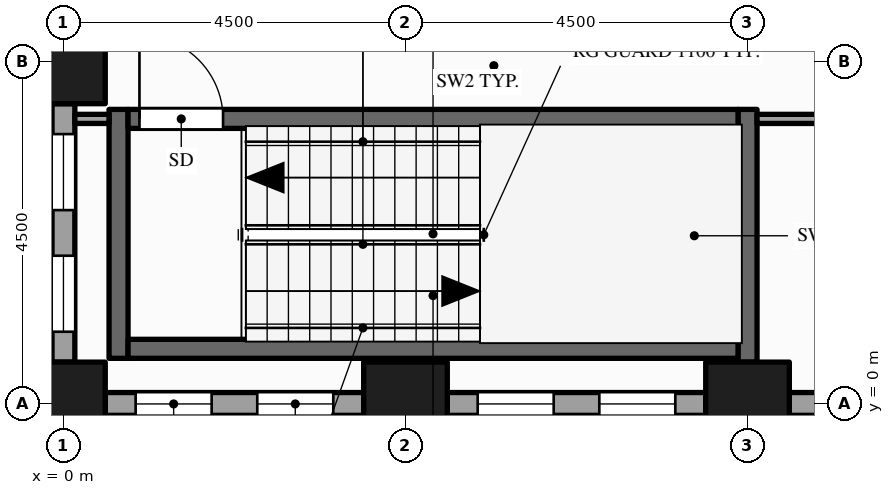
"""IFC4 building model, lengths in metres.
Left out: names, types, materials, properties, quantities, classifications, styles, units other than length and angle.
Written with IfcOpenShell. Run it as: python <this file> out.ifc"""

import sys

from ifc_helpers import new_model, si_unit, direction, frame, frame_2d, origin, origin_2d, place, context, subcontext, project, spatial, rectangle, hollow_rectangle, extrude, element, fill, save


model = new_model("IFC4")
c1 = context("Model", 3, precision=1e-05, world=origin(), true_north=direction((0.0, 1.0)))
c2 = subcontext(c1, "Body", "Model", "MODEL_VIEW")
j1 = project(units=[si_unit("LENGTHUNIT", "METRE"), si_unit("PLANEANGLEUNIT", "RADIAN")], contexts=[c1])
p1 = place(None, origin())
s1 = spatial("IfcSite", under=j1, at=p1, CompositionType="ELEMENT")
p2 = place(p1, origin())
s2 = spatial("IfcBuilding", under=s1, at=p2, CompositionType="ELEMENT")
p3 = place(p2, frame((0.0, 0.0, 61.0)))
s3 = spatial("IfcBuildingStorey", under=s2, at=p3, CompositionType="ELEMENT", Elevation=61.0)
for number, where, z_axis, x_axis in (
    (1, (0.0, 0.0, -0.15), (0.0, 0.0, 1.0), (1.0, 0.0, 0.0)),
    (2, (0.0, 4.5, -0.15), (0.0, 0.0, 1.0), (1.0, 0.0, 0.0)),
    (3, (4.5, 0.0, -0.15), (0.0, 0.0, 1.0), (1.0, 0.0, 0.0)),
    (4, (9.0, 0.0, -0.15), (0.0, 0.0, 1.0), (1.0, 0.0, 0.0)),
):
    element("IfcColumn", number, at=place(p3, frame(where, z_axis=z_axis, x_axis=x_axis)), inside=s3, PredefinedType="COLUMN", context=c2, shape_type="SweptSolid", body=[
        extrude(hollow_rectangle(XDim=1.1, YDim=1.1, WallThickness=0.06, at=origin_2d()), origin(), (0.0, 0.0, 1.0), 4.0),
    ])
p4 = place(p3, frame((0.55, 0.0, 0.0), z_axis=(0.0, 0.0, 1.0), x_axis=(1.0, 0.0, 0.0)))
e5 = element("IfcWall", 5, at=p4, inside=s3, PredefinedType="STANDARD", context=c2, shape_type="SweptSolid", body=[
    extrude(rectangle(XDim=3.4, YDim=0.3, at=frame_2d((1.7, 0.0))), origin(), (0.0, 0.0, 1.0), 3.144),
])
p5 = place(p4, frame((0.4, 0.0, 0.9)))
e6 = element("IfcOpeningElement", 6, at=p5, cuts=e5, PredefinedType="OPENING", context=c2, shape_type="SweptSolid", body=[
    extrude(rectangle(XDim=1.0, YDim=2.0, at=frame_2d((0.5, 1.0))), frame((0.0, 0.16, 0.0), z_axis=(0.0, -1.0, 0.0), x_axis=(1.0, 0.0, 0.0)), (0.0, 0.0, 1.0), 0.32),
])
p6 = place(p4, frame((2.0, 0.0, 0.9)))
e7 = element("IfcOpeningElement", 7, at=p6, cuts=e5, PredefinedType="OPENING", context=c2, shape_type="SweptSolid", body=[
    extrude(rectangle(XDim=1.0, YDim=2.0, at=frame_2d((0.5, 1.0))), frame((0.0, 0.16, 0.0), z_axis=(0.0, -1.0, 0.0), x_axis=(1.0, 0.0, 0.0)), (0.0, 0.0, 1.0), 0.32),
])
p7 = place(p3, frame((5.05, 0.0, 0.0), z_axis=(0.0, 0.0, 1.0), x_axis=(1.0, 0.0, 0.0)))
e8 = element("IfcWall", 8, at=p7, inside=s3, PredefinedType="STANDARD", context=c2, shape_type="SweptSolid", body=[
    extrude(rectangle(XDim=3.4, YDim=0.3, at=frame_2d((1.7, 0.0))), origin(), (0.0, 0.0, 1.0), 3.144),
])
p8 = place(p7, frame((0.4, 0.0, 0.9)))
e9 = element("IfcOpeningElement", 9, at=p8, cuts=e8, PredefinedType="OPENING", context=c2, shape_type="SweptSolid", body=[
    extrude(rectangle(XDim=1.0, YDim=2.0, at=frame_2d((0.5, 1.0))), frame((0.0, 0.16, 0.0), z_axis=(0.0, -1.0, 0.0), x_axis=(1.0, 0.0, 0.0)), (0.0, 0.0, 1.0), 0.32),
])
p9 = place(p7, frame((2.0, 0.0, 0.9)))
e10 = element("IfcOpeningElement", 10, at=p9, cuts=e8, PredefinedType="OPENING", context=c2, shape_type="SweptSolid", body=[
    extrude(rectangle(XDim=1.0, YDim=2.0, at=frame_2d((0.5, 1.0))), frame((0.0, 0.16, 0.0), z_axis=(0.0, -1.0, 0.0), x_axis=(1.0, 0.0, 0.0)), (0.0, 0.0, 1.0), 0.32),
])
p10 = place(p3, frame((9.55, 0.0, 0.0), z_axis=(0.0, 0.0, 1.0), x_axis=(1.0, 0.0, 0.0)))
e11 = element("IfcWall", 11, at=p10, inside=s3, PredefinedType="STANDARD", context=c2, shape_type="SweptSolid", body=[
    extrude(rectangle(XDim=3.4, YDim=0.3, at=frame_2d((1.7, 0.0))), origin(), (0.0, 0.0, 1.0), 3.144),
])
p11 = place(p10, frame((0.4, 0.0, 0.9)))
e12 = element("IfcOpeningElement", 12, at=p11, cuts=e11, PredefinedType="OPENING", context=c2, shape_type="SweptSolid", body=[
    extrude(rectangle(XDim=1.0, YDim=2.0, at=frame_2d((0.5, 1.0))), frame((0.0, 0.16, 0.0), z_axis=(0.0, -1.0, 0.0), x_axis=(1.0, 0.0, 0.0)), (0.0, 0.0, 1.0), 0.32),
])
p12 = place(p10, frame((2.0, 0.0, 0.9)))
e13 = element("IfcOpeningElement", 13, at=p12, cuts=e11, PredefinedType="OPENING", context=c2, shape_type="SweptSolid", body=[
    extrude(rectangle(XDim=1.0, YDim=2.0, at=frame_2d((0.5, 1.0))), frame((0.0, 0.16, 0.0), z_axis=(0.0, -1.0, 0.0), x_axis=(1.0, 0.0, 0.0)), (0.0, 0.0, 1.0), 0.32),
])
p13 = place(p3, frame((0.0, 3.95, 0.0), z_axis=(0.0, 0.0, 1.0), x_axis=(0.0, -1.0, 0.0)))
e14 = element("IfcWall", 14, at=p13, inside=s3, PredefinedType="STANDARD", context=c2, shape_type="SweptSolid", body=[
    extrude(rectangle(XDim=3.4, YDim=0.3, at=frame_2d((1.7, 0.0))), origin(), (0.0, 0.0, 1.0), 3.144),
])
p14 = place(p13, frame((0.4, 0.0, 0.9)))
e15 = element("IfcOpeningElement", 15, at=p14, cuts=e14, PredefinedType="OPENING", context=c2, shape_type="SweptSolid", body=[
    extrude(rectangle(XDim=1.0, YDim=2.0, at=frame_2d((0.5, 1.0))), frame((0.0, 0.16, 0.0), z_axis=(0.0, -1.0, 0.0), x_axis=(1.0, 0.0, 0.0)), (0.0, 0.0, 1.0), 0.32),
])
p15 = place(p13, frame((2.0, 0.0, 0.9)))
e16 = element("IfcOpeningElement", 16, at=p15, cuts=e14, PredefinedType="OPENING", context=c2, shape_type="SweptSolid", body=[
    extrude(rectangle(XDim=1.0, YDim=2.0, at=frame_2d((0.5, 1.0))), frame((0.0, 0.16, 0.0), z_axis=(0.0, -1.0, 0.0), x_axis=(1.0, 0.0, 0.0)), (0.0, 0.0, 1.0), 0.32),
])
p16 = place(p3, frame((0.725, 0.6, 0.0), z_axis=(0.0, 0.0, 1.0), x_axis=(0.0, 1.0, 0.0)))
e17 = element("IfcWall", 17, at=p16, inside=s3, PredefinedType="SHEAR", context=c2, shape_type="SweptSolid", body=[
    extrude(rectangle(XDim=3.275, YDim=0.25, at=frame_2d((1.637, 0.0))), origin(), (0.0, 0.0, 1.0), 3.85),
])
p17 = place(p3, frame((9.0, 0.55, 0.0), z_axis=(0.0, 0.0, 1.0), x_axis=(0.0, 1.0, 0.0)))
e18 = element("IfcWall", 18, at=p17, inside=s3, PredefinedType="SHEAR", context=c2, shape_type="SweptSolid", body=[
    extrude(rectangle(XDim=3.325, YDim=0.25, at=frame_2d((1.663, 0.0))), origin(), (0.0, 0.0, 1.0), 3.85),
])
p18 = place(p3, frame((0.85, 0.725, 0.0), z_axis=(0.0, 0.0, 1.0), x_axis=(1.0, 0.0, 0.0)))
e19 = element("IfcWall", 19, at=p18, inside=s3, PredefinedType="SHEAR", context=c2, shape_type="SweptSolid", body=[
    extrude(rectangle(XDim=8.025, YDim=0.25, at=frame_2d((4.012, 0.0))), origin(), (0.0, 0.0, 1.0), 3.85),
])
p19 = place(p3, frame((0.15, 3.75, 0.0), z_axis=(0.0, 0.0, 1.0), x_axis=(1.0, 0.0, 0.0)))
e20 = element("IfcWall", 20, at=p19, inside=s3, PredefinedType="PARTITIONING", context=c2, shape_type="SweptSolid", body=[
    extrude(rectangle(XDim=0.45, YDim=0.12, at=frame_2d((0.225, 0.0))), origin(), (0.0, 0.0, 1.0), 3.144),
])
p20 = place(p3, frame((0.85, 3.75, 0.0), z_axis=(0.0, 0.0, 1.0), x_axis=(1.0, 0.0, 0.0)))
e21 = element("IfcWall", 21, at=p20, inside=s3, PredefinedType="SHEAR", context=c2, shape_type="SweptSolid", body=[
    extrude(rectangle(XDim=8.025, YDim=0.25, at=frame_2d((4.012, 0.0))), origin(), (0.0, 0.0, 1.0), 3.85),
])
p21 = place(p20, frame((0.15, 0.0, 0.0)))
e22 = element("IfcOpeningElement", 22, at=p21, cuts=e21, PredefinedType="OPENING", context=c2, shape_type="SweptSolid", body=[
    extrude(rectangle(XDim=1.1, YDim=2.1, at=frame_2d((0.55, 1.05))), frame((0.0, 0.135, 0.0), z_axis=(0.0, -1.0, 0.0), x_axis=(1.0, 0.0, 0.0)), (0.0, 0.0, 1.0), 0.27),
])
p22 = place(p3, frame((9.125, 3.75, 0.0), z_axis=(0.0, 0.0, 1.0), x_axis=(1.0, 0.0, 0.0)))
e23 = element("IfcWall", 23, at=p22, inside=s3, PredefinedType="PARTITIONING", context=c2, shape_type="SweptSolid", body=[
    extrude(rectangle(XDim=4.315, YDim=0.12, at=frame_2d((2.157, 0.0))), origin(), (0.0, 0.0, 1.0), 2.938),
])
p23 = place(p5, origin())
e24 = element("IfcWindow", 24, at=p23, inside=s3, PartitioningType="SINGLE_PANEL", PredefinedType="WINDOW", context=c2, shape_type="SweptSolid", body=[
    extrude(rectangle(XDim=1.0, YDim=2.0, at=frame_2d((0.5, 1.0))), frame((0.0, 0.03, 0.0), z_axis=(0.0, -1.0, 0.0), x_axis=(1.0, 0.0, 0.0)), (0.0, 0.0, 1.0), 0.06),
])
fill(e6, e24)
p24 = place(p6, origin())
e25 = element("IfcWindow", 25, at=p24, inside=s3, PartitioningType="SINGLE_PANEL", PredefinedType="WINDOW", context=c2, shape_type="SweptSolid", body=[
    extrude(rectangle(XDim=1.0, YDim=2.0, at=frame_2d((0.5, 1.0))), frame((0.0, 0.03, 0.0), z_axis=(0.0, -1.0, 0.0), x_axis=(1.0, 0.0, 0.0)), (0.0, 0.0, 1.0), 0.06),
])
fill(e7, e25)
p25 = place(p8, origin())
e26 = element("IfcWindow", 26, at=p25, inside=s3, PartitioningType="SINGLE_PANEL", PredefinedType="WINDOW", context=c2, shape_type="SweptSolid", body=[
    extrude(rectangle(XDim=1.0, YDim=2.0, at=frame_2d((0.5, 1.0))), frame((0.0, 0.03, 0.0), z_axis=(0.0, -1.0, 0.0), x_axis=(1.0, 0.0, 0.0)), (0.0, 0.0, 1.0), 0.06),
])
fill(e9, e26)
p26 = place(p9, origin())
e27 = element("IfcWindow", 27, at=p26, inside=s3, PartitioningType="SINGLE_PANEL", PredefinedType="WINDOW", context=c2, shape_type="SweptSolid", body=[
    extrude(rectangle(XDim=1.0, YDim=2.0, at=frame_2d((0.5, 1.0))), frame((0.0, 0.03, 0.0), z_axis=(0.0, -1.0, 0.0), x_axis=(1.0, 0.0, 0.0)), (0.0, 0.0, 1.0), 0.06),
])
fill(e10, e27)
p27 = place(p14, origin())
e28 = element("IfcWindow", 28, at=p27, inside=s3, PartitioningType="SINGLE_PANEL", PredefinedType="WINDOW", context=c2, shape_type="SweptSolid", body=[
    extrude(rectangle(XDim=1.0, YDim=2.0, at=frame_2d((0.5, 1.0))), frame((0.0, 0.03, 0.0), z_axis=(0.0, -1.0, 0.0), x_axis=(1.0, 0.0, 0.0)), (0.0, 0.0, 1.0), 0.06),
])
fill(e15, e28)
p28 = place(p15, origin())
e29 = element("IfcWindow", 29, at=p28, inside=s3, PartitioningType="SINGLE_PANEL", PredefinedType="WINDOW", context=c2, shape_type="SweptSolid", body=[
    extrude(rectangle(XDim=1.0, YDim=2.0, at=frame_2d((0.5, 1.0))), frame((0.0, 0.03, 0.0), z_axis=(0.0, -1.0, 0.0), x_axis=(1.0, 0.0, 0.0)), (0.0, 0.0, 1.0), 0.06),
])
fill(e16, e29)
p29 = place(p21, origin())
e30 = element("IfcDoor", 30, at=p29, inside=s3, OperationType="SINGLE_SWING_LEFT", PredefinedType="DOOR", context=c2, shape_type="SweptSolid", body=[
    extrude(rectangle(XDim=1.1, YDim=2.1, at=frame_2d((0.55, 1.05))), frame((0.0, 0.025, 0.0), z_axis=(0.0, -1.0, 0.0), x_axis=(1.0, 0.0, 0.0)), (0.0, 0.0, 1.0), 0.05),
])
fill(e22, e30)
save(model, sys.argv[1])
